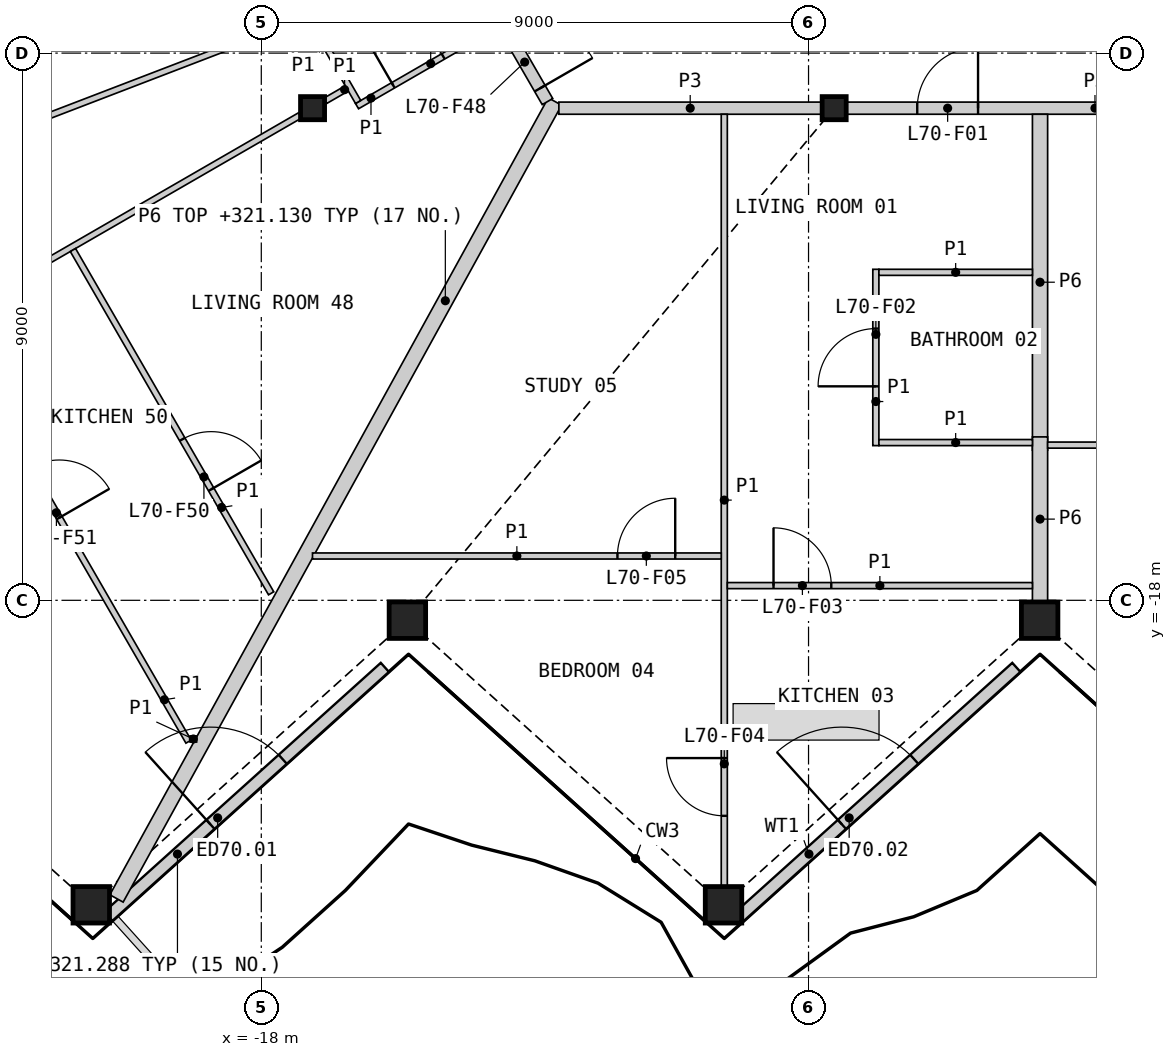
"""IFC4 building model, lengths in metres.
Left out: names, types, materials, properties, quantities, classifications, styles, units other than length and angle.
Written with IfcOpenShell. Run it as: python <this file> out.ifc"""

import sys

from ifc_helpers import new_model, si_unit, direction, frame, frame_2d, origin, origin_2d, place, context, subcontext, project, spatial, rectangle, hollow_rectangle, i_section, extrude, element, fill, save


model = new_model("IFC4")
c1 = context("Model", 3, precision=1e-05, world=origin(), true_north=direction((0.0, 1.0)))
c2 = subcontext(c1, "Body", "Model", "MODEL_VIEW")
j1 = project(units=[si_unit("LENGTHUNIT", "METRE"), si_unit("PLANEANGLEUNIT", "RADIAN")], contexts=[c1])
p1 = place(None, origin())
s1 = spatial("IfcSite", under=j1, at=p1, CompositionType="ELEMENT")
p2 = place(p1, origin())
s2 = spatial("IfcBuilding", under=s1, at=p2, CompositionType="ELEMENT")
p3 = place(p2, frame((0.0, 0.0, 318.8)))
s3 = spatial("IfcBuildingStorey", under=s2, at=p3, CompositionType="ELEMENT", Elevation=318.8)
for number, where, z_axis, x_axis in (
    (1, (-20.796, -23.008, 0.0), (0.0, 0.0, 1.0), (1.0, 0.0, 0.0)),
    (2, (-15.597, -18.327, 0.0), (0.0, 0.0, 1.0), (1.0, 0.0, 0.0)),
    (3, (-10.398, -23.008, 0.0), (0.0, 0.0, 1.0), (1.0, 0.0, 0.0)),
    (4, (-5.199, -18.327, 0.0), (0.0, 0.0, 1.0), (1.0, 0.0, 0.0)),
):
    element("IfcColumn", number, at=place(p3, frame(where, z_axis=z_axis, x_axis=x_axis)), inside=s3, PredefinedType="COLUMN", context=c2, shape_type="SweptSolid", body=[
        extrude(hollow_rectangle(XDim=0.6, YDim=0.6, WallThickness=0.04, at=origin_2d()), origin(), (0.0, 0.0, 1.0), 3.4),
    ])
for number, where, z_axis, x_axis in (
    (5, (-17.157, -9.906, 0.0), (0.0, 0.0, 1.0), (1.0, 0.0, 0.0)),
    (6, (-8.578, -9.906, 0.0), (0.0, 0.0, 1.0), (1.0, 0.0, 0.0)),
):
    element("IfcColumn", number, at=place(p3, frame(where, z_axis=z_axis, x_axis=x_axis)), inside=s3, PredefinedType="COLUMN", context=c2, shape_type="SweptSolid", body=[
        extrude(i_section(OverallWidth=0.396, OverallDepth=0.381, WebThickness=0.019, FlangeThickness=0.03, at=origin_2d()), origin(), (0.0, 0.0, 1.0), 3.4),
    ])
p4 = place(p3, frame((-20.516, -23.198, 0.0), z_axis=(0.0, 0.0, 1.0), x_axis=(0.743121537674, 0.66915646918, 0.0)))
e7 = element("IfcWall", 7, at=p4, inside=s3, PredefinedType="SOLIDWALL", context=c2, shape_type="SweptSolid", body=[
    extrude(rectangle(XDim=6.12, YDim=0.2, at=frame_2d((3.06, 0.0))), origin(), (0.0, 0.0, 1.0), 2.488),
])
p5 = place(p4, frame((2.26, 0.0, 0.0)))
e8 = element("IfcOpeningElement", 8, at=p5, cuts=e7, PredefinedType="OPENING", context=c2, shape_type="SweptSolid", body=[
    extrude(rectangle(XDim=1.6, YDim=2.25, at=frame_2d((0.8, 1.125))), frame((0.0, 0.11, 0.0), z_axis=(0.0, -1.0, 0.0), x_axis=(1.0, 0.0, 0.0)), (0.0, 0.0, 1.0), 0.22),
])
p6 = place(p3, frame((-10.13, -23.198, 0.0), z_axis=(0.0, 0.0, 1.0), x_axis=(0.743139400616, 0.669136631229, 0.0)))
e9 = element("IfcWall", 9, at=p6, inside=s3, PredefinedType="SOLIDWALL", context=c2, shape_type="SweptSolid", body=[
    extrude(rectangle(XDim=6.12, YDim=0.2, at=frame_2d((3.06, 0.0))), origin(), (0.0, 0.0, 1.0), 2.488),
])
p7 = place(p6, frame((2.26, 0.0, 0.0)))
e10 = element("IfcOpeningElement", 10, at=p7, cuts=e9, PredefinedType="OPENING", context=c2, shape_type="SweptSolid", body=[
    extrude(rectangle(XDim=1.6, YDim=2.25, at=frame_2d((0.8, 1.125))), frame((0.0, 0.11, 0.0), z_axis=(0.0, -1.0, 0.0), x_axis=(1.0, 0.0, 0.0)), (0.0, 0.0, 1.0), 0.22),
])
p8 = place(p3, frame((-20.381, -22.904, 0.0), z_axis=(0.0, 0.0, 1.0), x_axis=(0.481994550341, 0.876174214093, 0.0)))
e11 = element("IfcWall", 11, at=p8, inside=s3, PredefinedType="PARTITIONING", context=c2, shape_type="SweptSolid", body=[
    extrude(rectangle(XDim=14.96, YDim=0.25, at=frame_2d((7.48, 0.0))), origin(), (0.0, 0.0, 1.0), 2.33),
])
p9 = place(p3, frame((-8.371, -9.906, 0.0), z_axis=(0.0, 0.0, 1.0), x_axis=(1.0, 0.0, 0.0)))
e12 = element("IfcWall", 12, at=p9, inside=s3, PredefinedType="PARTITIONING", context=c2, shape_type="SweptSolid", body=[
    extrude(rectangle(XDim=8.163, YDim=0.2, at=frame_2d((4.082, 0.0))), origin(), (0.0, 0.0, 1.0), 3.1),
])
p10 = place(p9, frame((1.159, 0.0, 0.0)))
e13 = element("IfcOpeningElement", 13, at=p10, cuts=e12, PredefinedType="OPENING", context=c2, shape_type="SweptSolid", body=[
    extrude(rectangle(XDim=1.0, YDim=2.1, at=frame_2d((0.5, 1.05))), frame((0.0, 0.11, 0.0), z_axis=(0.0, -1.0, 0.0), x_axis=(1.0, 0.0, 0.0)), (0.0, 0.0, 1.0), 0.22),
])
p11 = place(p3, frame((-5.193, -15.531, 0.0), z_axis=(0.0, 0.0, 1.0), x_axis=(0.0, 1.0, 0.0)))
e14 = element("IfcWall", 14, at=p11, inside=s3, PredefinedType="PARTITIONING", context=c2, shape_type="SweptSolid", body=[
    extrude(rectangle(XDim=5.525, YDim=0.25, at=frame_2d((2.762, 0.0))), origin(), (0.0, 0.0, 1.0), 2.33),
])
p12 = place(p3, frame((-13.106, -9.906, 0.0), z_axis=(0.0, 0.0, 1.0), x_axis=(1.0, 0.0, 0.0)))
e15 = element("IfcWall", 15, at=p12, inside=s3, PredefinedType="PARTITIONING", context=c2, shape_type="SweptSolid", body=[
    extrude(rectangle(XDim=4.32, YDim=0.2, at=frame_2d((2.16, 0.0))), origin(), (0.0, 0.0, 1.0), 3.1),
])
p13 = place(p3, frame((-15.131, -6.614, 0.0), z_axis=(0.0, 0.0, 1.0), x_axis=(0.499967746641, -0.866044024469, 0.0)))
e16 = element("IfcWall", 16, at=p13, inside=s3, PredefinedType="PARTITIONING", context=c2, shape_type="SweptSolid", body=[
    extrude(rectangle(XDim=3.676, YDim=0.2, at=frame_2d((1.838, 0.0))), origin(), (0.0, 0.0, 1.0), 3.1),
])
p14 = place(p13, frame((2.426, 0.0, 0.0)))
e17 = element("IfcOpeningElement", 17, at=p14, cuts=e16, PredefinedType="OPENING", context=c2, shape_type="SweptSolid", body=[
    extrude(rectangle(XDim=1.0, YDim=2.1, at=frame_2d((0.5, 1.05))), frame((0.0, 0.11, 0.0), z_axis=(0.0, -1.0, 0.0), x_axis=(1.0, 0.0, 0.0)), (0.0, 0.0, 1.0), 0.22),
])
p15 = place(p3, frame((-5.193, -18.017, 0.0), z_axis=(0.0, 0.0, 1.0), x_axis=(0.0, 1.0, 0.0)))
e18 = element("IfcWall", 18, at=p15, inside=s3, PredefinedType="PARTITIONING", context=c2, shape_type="SweptSolid", body=[
    extrude(rectangle(XDim=2.705, YDim=0.25, at=frame_2d((1.352, 0.0))), origin(), (0.0, 0.0, 1.0), 2.33),
])
p16 = place(p3, frame((-29.338, -13.042, 0.0), z_axis=(0.0, 0.0, 1.0), x_axis=(0.93358243931, 0.358362705944, 0.0)))
e19 = element("IfcWall", 19, at=p16, inside=s3, PredefinedType="PARTITIONING", context=c2, shape_type="SweptSolid", body=[
    extrude(rectangle(XDim=12.928, YDim=0.1, at=frame_2d((6.464, 0.0))), origin(), (0.0, 0.0, 1.0), 2.33),
])
p17 = place(p16, frame((5.183, 0.0, 0.0)))
e20 = element("IfcOpeningElement", 20, at=p17, cuts=e19, PredefinedType="OPENING", context=c2, shape_type="SweptSolid", body=[
    extrude(rectangle(XDim=0.95, YDim=2.1, at=frame_2d((0.475, 1.05))), frame((0.0, 0.06, 0.0), z_axis=(0.0, -1.0, 0.0), x_axis=(1.0, 0.0, 0.0)), (0.0, 0.0, 1.0), 0.12),
])
p18 = place(p3, frame((-10.385, -22.698, 0.0), z_axis=(0.0, 0.0, 1.0), x_axis=(0.0, 1.0, 0.0)))
e21 = element("IfcWall", 21, at=p18, inside=s3, PredefinedType="PARTITIONING", context=c2, shape_type="SweptSolid", body=[
    extrude(rectangle(XDim=12.692, YDim=0.1, at=frame_2d((6.346, 0.0))), origin(), (0.0, 0.0, 1.0), 2.33),
])
p19 = place(p18, frame((1.153, 0.0, 0.0)))
e22 = element("IfcOpeningElement", 22, at=p19, cuts=e21, PredefinedType="OPENING", context=c2, shape_type="SweptSolid", body=[
    extrude(rectangle(XDim=0.95, YDim=2.1, at=frame_2d((0.475, 1.05))), frame((0.0, 0.06, 0.0), z_axis=(0.0, -1.0, 0.0), x_axis=(1.0, 0.0, 0.0)), (0.0, 0.0, 1.0), 0.12),
])
p20 = place(p3, frame((-27.122, -15.659, 0.0), z_axis=(0.0, 0.0, 1.0), x_axis=(0.866021046153, 0.500007547564, 0.0)))
e23 = element("IfcWall", 23, at=p20, inside=s3, PredefinedType="PARTITIONING", context=c2, shape_type="SweptSolid", body=[
    extrude(rectangle(XDim=11.267, YDim=0.1, at=frame_2d((5.634, 0.0))), origin(), (0.0, 0.0, 1.0), 2.33),
])
p21 = place(p20, frame((1.452, 0.0, 0.0)))
e24 = element("IfcOpeningElement", 24, at=p21, cuts=e23, PredefinedType="OPENING", context=c2, shape_type="SweptSolid", body=[
    extrude(rectangle(XDim=0.95, YDim=2.1, at=frame_2d((0.475, 1.05))), frame((0.0, 0.06, 0.0), z_axis=(0.0, -1.0, 0.0), x_axis=(1.0, 0.0, 0.0)), (0.0, 0.0, 1.0), 0.12),
])
p22 = place(p3, frame((-23.173, -13.437, 0.0), z_axis=(0.0, 0.0, 1.0), x_axis=(0.500018284498, -0.866014846967, 0.0)))
e25 = element("IfcWall", 25, at=p22, inside=s3, PredefinedType="PARTITIONING", context=c2, shape_type="SweptSolid", body=[
    extrude(rectangle(XDim=7.953, YDim=0.1, at=frame_2d((3.977, 0.0))), origin(), (0.0, 0.0, 1.0), 2.33),
])
p23 = place(p22, frame((2.751, 0.0, 0.0)))
e26 = element("IfcOpeningElement", 26, at=p23, cuts=e25, PredefinedType="OPENING", context=c2, shape_type="SweptSolid", body=[
    extrude(rectangle(XDim=0.95, YDim=2.1, at=frame_2d((0.475, 1.05))), frame((0.0, 0.06, 0.0), z_axis=(0.0, -1.0, 0.0), x_axis=(1.0, 0.0, 0.0)), (0.0, 0.0, 1.0), 0.12),
])
p24 = place(p3, frame((-17.158, -17.271, 0.0), z_axis=(0.0, 0.0, 1.0), x_axis=(1.0, 0.0, 0.0)))
e27 = element("IfcWall", 27, at=p24, inside=s3, PredefinedType="PARTITIONING", context=c2, shape_type="SweptSolid", body=[
    extrude(rectangle(XDim=6.722, YDim=0.1, at=frame_2d((3.361, 0.0))), origin(), (0.0, 0.0, 1.0), 2.33),
])
p25 = place(p24, frame((5.015, 0.0, 0.0)))
e28 = element("IfcOpeningElement", 28, at=p25, cuts=e27, PredefinedType="OPENING", context=c2, shape_type="SweptSolid", body=[
    extrude(rectangle(XDim=0.95, YDim=2.1, at=frame_2d((0.475, 1.05))), frame((0.0, 0.06, 0.0), z_axis=(0.0, -1.0, 0.0), x_axis=(1.0, 0.0, 0.0)), (0.0, 0.0, 1.0), 0.12),
])
p26 = place(p3, frame((-21.098, -12.239, 0.0), z_axis=(0.0, 0.0, 1.0), x_axis=(0.499973122483, -0.86604092097, 0.0)))
e29 = element("IfcWall", 29, at=p26, inside=s3, PredefinedType="PARTITIONING", context=c2, shape_type="SweptSolid", body=[
    extrude(rectangle(XDim=6.52, YDim=0.1, at=frame_2d((3.26, 0.0))), origin(), (0.0, 0.0, 1.0), 2.33),
])
p27 = place(p26, frame((3.596, 0.0, 0.0)))
e30 = element("IfcOpeningElement", 30, at=p27, cuts=e29, PredefinedType="OPENING", context=c2, shape_type="SweptSolid", body=[
    extrude(rectangle(XDim=0.95, YDim=2.1, at=frame_2d((0.475, 1.05))), frame((0.0, 0.06, 0.0), z_axis=(0.0, -1.0, 0.0), x_axis=(1.0, 0.0, 0.0)), (0.0, 0.0, 1.0), 0.12),
])
p28 = place(p3, frame((-10.336, -17.758, 0.0), z_axis=(0.0, 0.0, 1.0), x_axis=(1.0, 0.0, 0.0)))
e31 = element("IfcWall", 31, at=p28, inside=s3, PredefinedType="PARTITIONING", context=c2, shape_type="SweptSolid", body=[
    extrude(rectangle(XDim=5.018, YDim=0.1, at=frame_2d((2.509, 0.0))), origin(), (0.0, 0.0, 1.0), 2.33),
])
p29 = place(p28, frame((0.76, 0.0, 0.0)))
e32 = element("IfcOpeningElement", 32, at=p29, cuts=e31, PredefinedType="OPENING", context=c2, shape_type="SweptSolid", body=[
    extrude(rectangle(XDim=0.95, YDim=2.1, at=frame_2d((0.475, 1.05))), frame((0.0, 0.06, 0.0), z_axis=(0.0, -1.0, 0.0), x_axis=(1.0, 0.0, 0.0)), (0.0, 0.0, 1.0), 0.12),
])
p30 = place(p3, frame((-5.068, -15.447, 0.0), z_axis=(0.0, 0.0, 1.0), x_axis=(1.0, 0.0, 0.0)))
e33 = element("IfcWall", 33, at=p30, inside=s3, PredefinedType="PARTITIONING", context=c2, shape_type="SweptSolid", body=[
    extrude(rectangle(XDim=5.018, YDim=0.1, at=frame_2d((2.509, 0.0))), origin(), (0.0, 0.0, 1.0), 2.33),
])
p31 = place(p30, frame((3.206, 0.0, 0.0)))
e34 = element("IfcOpeningElement", 34, at=p31, cuts=e33, PredefinedType="OPENING", context=c2, shape_type="SweptSolid", body=[
    extrude(rectangle(XDim=0.95, YDim=2.1, at=frame_2d((0.475, 1.05))), frame((0.0, 0.06, 0.0), z_axis=(0.0, -1.0, 0.0), x_axis=(1.0, 0.0, 0.0)), (0.0, 0.0, 1.0), 0.12),
])
p32 = place(p3, frame((-7.893, -15.456, 0.0), z_axis=(0.0, 0.0, 1.0), x_axis=(0.0, 1.0, 0.0)))
e35 = element("IfcWall", 35, at=p32, inside=s3, PredefinedType="PARTITIONING", context=c2, shape_type="SweptSolid", body=[
    extrude(rectangle(XDim=2.9, YDim=0.1, at=frame_2d((1.45, 0.0))), origin(), (0.0, 0.0, 1.0), 2.33),
])
p33 = place(p32, frame((0.975, 0.0, 0.0)))
e36 = element("IfcOpeningElement", 36, at=p33, cuts=e35, PredefinedType="OPENING", context=c2, shape_type="SweptSolid", body=[
    extrude(rectangle(XDim=0.95, YDim=2.1, at=frame_2d((0.475, 1.05))), frame((0.0, 0.06, 0.0), z_axis=(0.0, -1.0, 0.0), x_axis=(1.0, 0.0, 0.0)), (0.0, 0.0, 1.0), 0.12),
])
for number, where, z_axis, x_axis in (
    (37, (-7.843, -12.606, 0.0), (0.0, 0.0, 1.0), (1.0, 0.0, 0.0)),
    (38, (-7.843, -15.406, 0.0), (0.0, 0.0, 1.0), (1.0, 0.0, 0.0)),
):
    element("IfcWall", number, at=place(p3, frame(where, z_axis=z_axis, x_axis=x_axis)), inside=s3, PredefinedType="PARTITIONING", context=c2, shape_type="SweptSolid", body=[
        extrude(rectangle(XDim=2.525, YDim=0.1, at=frame_2d((1.262, 0.0))), origin(), (0.0, 0.0, 1.0), 2.33),
    ])
p34 = place(p3, frame((-16.426, -9.872, 0.0), z_axis=(0.0, 0.0, 1.0), x_axis=(0.866029095148, 0.499993606316, 0.0)))
e39 = element("IfcWall", 39, at=p34, inside=s3, PredefinedType="PARTITIONING", context=c2, shape_type="SweptSolid", body=[
    extrude(rectangle(XDim=2.65, YDim=0.1, at=frame_2d((1.325, 0.0))), origin(), (0.0, 0.0, 1.0), 2.33),
])
p35 = place(p34, frame((0.686, 0.0, 0.0)))
e40 = element("IfcOpeningElement", 40, at=p35, cuts=e39, PredefinedType="OPENING", context=c2, shape_type="SweptSolid", body=[
    extrude(rectangle(XDim=0.95, YDim=2.1, at=frame_2d((0.475, 1.05))), frame((0.0, 0.06, 0.0), z_axis=(0.0, -1.0, 0.0), x_axis=(1.0, 0.0, 0.0)), (0.0, 0.0, 1.0), 0.12),
])
p36 = place(p3, frame((-17.507, -7.899, 0.0), z_axis=(0.0, 0.0, 1.0), x_axis=(0.499946605688, -0.86605622881, 0.0)))
e41 = element("IfcWall", 41, at=p36, inside=s3, PredefinedType="PARTITIONING", context=c2, shape_type="SweptSolid", body=[
    extrude(rectangle(XDim=2.2, YDim=0.1, at=frame_2d((1.1, 0.0))), origin(), (0.0, 0.0, 1.0), 2.33),
])
p37 = place(p3, frame((-16.949, -9.786, 0.0), z_axis=(0.0, 0.0, 1.0), x_axis=(0.866036909293, 0.499980071345, 0.0)))
e42 = element("IfcWall", 42, at=p37, inside=s3, PredefinedType="PARTITIONING", context=c2, shape_type="SweptSolid", body=[
    extrude(rectangle(XDim=0.41, YDim=0.1, at=frame_2d((0.205, 0.0))), origin(), (0.0, 0.0, 1.0), 2.33),
])
p38 = place(p3, frame((-19.171, -20.281, 0.0), z_axis=(0.0, 0.0, 1.0), x_axis=(1.0, 0.0, 0.0)))
e43 = element("IfcWall", 43, at=p38, inside=s3, PredefinedType="PARTITIONING", context=c2, shape_type="SweptSolid", body=[
    extrude(rectangle(XDim=0.108, YDim=0.1, at=frame_2d((0.054, 0.0))), origin(), (0.0, 0.0, 1.0), 2.33),
])
p39 = place(p5, origin())
e44 = element("IfcDoor", 44, at=p39, inside=s3, OperationType="DOUBLE_DOOR_SINGLE_SWING", PredefinedType="DOOR", context=c2, shape_type="SweptSolid", body=[
    extrude(rectangle(XDim=1.6, YDim=2.25, at=frame_2d((0.8, 1.125))), frame((0.0, 0.025, 0.0), z_axis=(0.0, -1.0, 0.0), x_axis=(1.0, 0.0, 0.0)), (0.0, 0.0, 1.0), 0.05),
])
fill(e8, e44)
p40 = place(p7, origin())
e45 = element("IfcDoor", 45, at=p40, inside=s3, OperationType="DOUBLE_DOOR_SINGLE_SWING", PredefinedType="DOOR", context=c2, shape_type="SweptSolid", body=[
    extrude(rectangle(XDim=1.6, YDim=2.25, at=frame_2d((0.8, 1.125))), frame((0.0, 0.025, 0.0), z_axis=(0.0, -1.0, 0.0), x_axis=(1.0, 0.0, 0.0)), (0.0, 0.0, 1.0), 0.05),
])
fill(e10, e45)
p41 = place(p10, origin())
e46 = element("IfcDoor", 46, at=p41, inside=s3, OperationType="SINGLE_SWING_RIGHT", PredefinedType="DOOR", context=c2, shape_type="SweptSolid", body=[
    extrude(rectangle(XDim=1.0, YDim=2.1, at=frame_2d((0.5, 1.05))), frame((0.0, 0.025, 0.0), z_axis=(0.0, -1.0, 0.0), x_axis=(1.0, 0.0, 0.0)), (0.0, 0.0, 1.0), 0.05),
])
fill(e13, e46)
p42 = place(p33, origin())
e47 = element("IfcDoor", 47, at=p42, inside=s3, OperationType="SINGLE_SWING_LEFT", PredefinedType="DOOR", context=c2, shape_type="SweptSolid", body=[
    extrude(rectangle(XDim=0.95, YDim=2.1, at=frame_2d((0.475, 1.05))), frame((0.0, 0.025, 0.0), z_axis=(0.0, -1.0, 0.0), x_axis=(1.0, 0.0, 0.0)), (0.0, 0.0, 1.0), 0.05),
])
fill(e36, e47)
p43 = place(p29, origin())
e48 = element("IfcDoor", 48, at=p43, inside=s3, OperationType="SINGLE_SWING_LEFT", PredefinedType="DOOR", context=c2, shape_type="SweptSolid", body=[
    extrude(rectangle(XDim=0.95, YDim=2.1, at=frame_2d((0.475, 1.05))), frame((0.0, 0.025, 0.0), z_axis=(0.0, -1.0, 0.0), x_axis=(1.0, 0.0, 0.0)), (0.0, 0.0, 1.0), 0.05),
])
fill(e32, e48)
p44 = place(p19, origin())
e49 = element("IfcDoor", 49, at=p44, inside=s3, OperationType="SINGLE_SWING_RIGHT", PredefinedType="DOOR", context=c2, shape_type="SweptSolid", body=[
    extrude(rectangle(XDim=0.95, YDim=2.1, at=frame_2d((0.475, 1.05))), frame((0.0, 0.025, 0.0), z_axis=(0.0, -1.0, 0.0), x_axis=(1.0, 0.0, 0.0)), (0.0, 0.0, 1.0), 0.05),
])
fill(e22, e49)
p45 = place(p25, origin())
e50 = element("IfcDoor", 50, at=p45, inside=s3, OperationType="SINGLE_SWING_RIGHT", PredefinedType="DOOR", context=c2, shape_type="SweptSolid", body=[
    extrude(rectangle(XDim=0.95, YDim=2.1, at=frame_2d((0.475, 1.05))), frame((0.0, 0.025, 0.0), z_axis=(0.0, -1.0, 0.0), x_axis=(1.0, 0.0, 0.0)), (0.0, 0.0, 1.0), 0.05),
])
fill(e28, e50)
p46 = place(p14, origin())
e51 = element("IfcDoor", 51, at=p46, inside=s3, OperationType="SINGLE_SWING_RIGHT", PredefinedType="DOOR", context=c2, shape_type="SweptSolid", body=[
    extrude(rectangle(XDim=1.0, YDim=2.1, at=frame_2d((0.5, 1.05))), frame((0.0, 0.025, 0.0), z_axis=(0.0, -1.0, 0.0), x_axis=(1.0, 0.0, 0.0)), (0.0, 0.0, 1.0), 0.05),
])
fill(e17, e51)
p47 = place(p35, origin())
e52 = element("IfcDoor", 52, at=p47, inside=s3, OperationType="SINGLE_SWING_LEFT", PredefinedType="DOOR", context=c2, shape_type="SweptSolid", body=[
    extrude(rectangle(XDim=0.95, YDim=2.1, at=frame_2d((0.475, 1.05))), frame((0.0, 0.025, 0.0), z_axis=(0.0, -1.0, 0.0), x_axis=(1.0, 0.0, 0.0)), (0.0, 0.0, 1.0), 0.05),
])
fill(e40, e52)
p48 = place(p27, origin())
e53 = element("IfcDoor", 53, at=p48, inside=s3, OperationType="SINGLE_SWING_RIGHT", PredefinedType="DOOR", context=c2, shape_type="SweptSolid", body=[
    extrude(rectangle(XDim=0.95, YDim=2.1, at=frame_2d((0.475, 1.05))), frame((0.0, 0.025, 0.0), z_axis=(0.0, -1.0, 0.0), x_axis=(1.0, 0.0, 0.0)), (0.0, 0.0, 1.0), 0.05),
])
fill(e30, e53)
p49 = place(p23, origin())
e54 = element("IfcDoor", 54, at=p49, inside=s3, OperationType="SINGLE_SWING_RIGHT", PredefinedType="DOOR", context=c2, shape_type="SweptSolid", body=[
    extrude(rectangle(XDim=0.95, YDim=2.1, at=frame_2d((0.475, 1.05))), frame((0.0, 0.025, 0.0), z_axis=(0.0, -1.0, 0.0), x_axis=(1.0, 0.0, 0.0)), (0.0, 0.0, 1.0), 0.05),
])
fill(e26, e54)
save(model, sys.argv[1])
